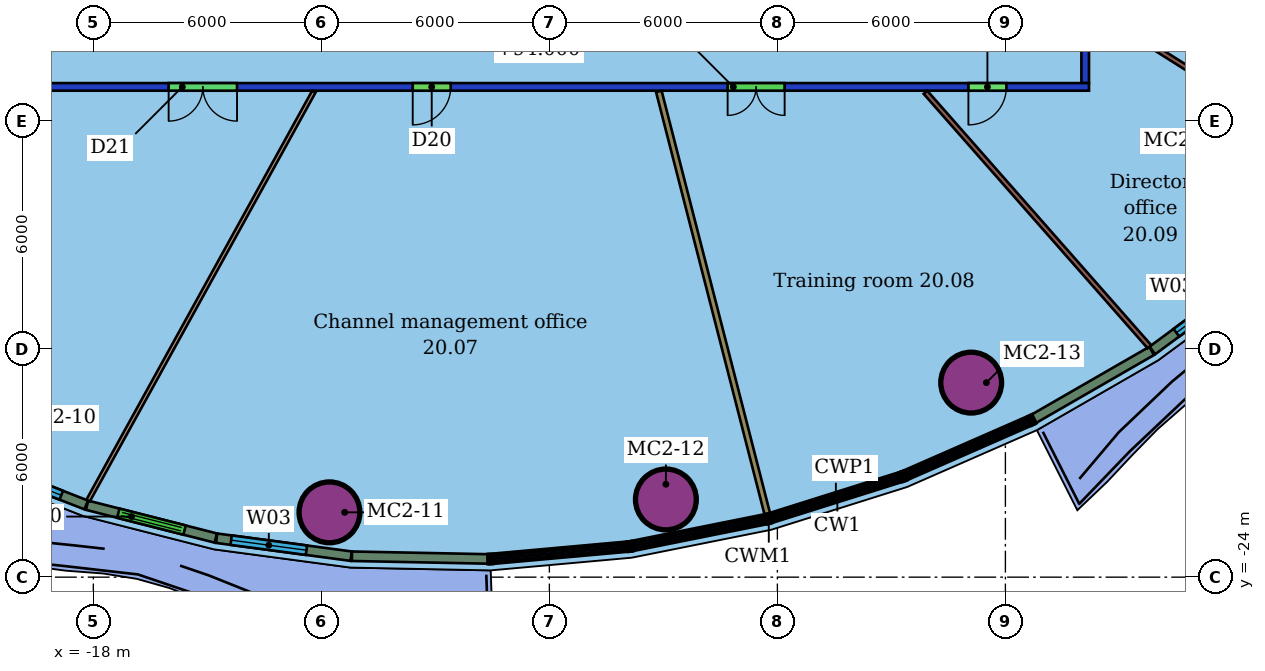
"""IFC4 building model, lengths in metres.
Left out: names, types, materials, properties, quantities, classifications, styles, units other than length and angle.
Written with IfcOpenShell. Run it as: python <this file> out.ifc"""

import sys

from ifc_helpers import new_model, si_unit, direction, frame, frame_2d, origin, origin_2d, place, context, subcontext, project, spatial, rectangle, hollow_circle, extrude, element, fill, save


model = new_model("IFC4")
c1 = context("Model", 3, precision=1e-05, world=origin(), true_north=direction((0.0, 1.0)))
c2 = subcontext(c1, "Body", "Model", "MODEL_VIEW")
j1 = project(units=[si_unit("LENGTHUNIT", "METRE"), si_unit("PLANEANGLEUNIT", "RADIAN")], contexts=[c1])
p1 = place(None, origin())
s1 = spatial("IfcSite", under=j1, at=p1, CompositionType="ELEMENT")
p2 = place(p1, origin())
s2 = spatial("IfcBuilding", under=s1, at=p2, CompositionType="ELEMENT")
p3 = place(p2, frame((0.0, 0.0, 92.2)))
s3 = spatial("IfcBuildingStorey", under=s2, at=p3, CompositionType="ELEMENT", Elevation=92.2)
for number, where, z_axis, x_axis in (
    (1, (-11.787, -22.294, 0.0), (0.0, 0.0, 1.0), (1.0, 0.0, 0.0)),
    (2, (-2.934, -21.956, 0.0), (0.0, 0.0, 1.0), (1.0, 0.0, 0.0)),
    (3, (5.1, -18.881, 0.0), (0.0, 0.0, 1.0), (1.0, 0.0, 0.0)),
):
    element("IfcColumn", number, at=place(p3, frame(where, z_axis=z_axis, x_axis=x_axis)), inside=s3, PredefinedType="COLUMN", context=c2, shape_type="SweptSolid", body=[
        extrude(hollow_circle(Radius=0.8, WallThickness=0.055, at=origin_2d()), origin(), (0.0, 0.0, 1.0), 3.45),
    ])
p4 = place(p3, frame((8.2, -11.1, 0.0), z_axis=(0.0, 0.0, 1.0), x_axis=(-1.0, 0.0, 0.0)))
e4 = element("IfcWall", 4, at=p4, inside=s3, PredefinedType="PARTITIONING", context=c2, shape_type="SweptSolid", body=[
    extrude(rectangle(XDim=28.4, YDim=0.2, at=frame_2d((14.2, 0.0))), origin(), (0.0, 0.0, 1.0), 3.0),
])
p5 = place(p4, frame((22.418, 0.0, 0.0)))
e5 = element("IfcOpeningElement", 5, at=p5, cuts=e4, PredefinedType="OPENING", context=c2, shape_type="SweptSolid", body=[
    extrude(rectangle(XDim=1.8, YDim=2.1, at=frame_2d((0.9, 1.05))), frame((0.0, 0.11, 0.0), z_axis=(0.0, -1.0, 0.0), x_axis=(1.0, 0.0, 0.0)), (0.0, 0.0, 1.0), 0.22),
])
p6 = place(p4, frame((16.796, 0.0, 0.0)))
e6 = element("IfcOpeningElement", 6, at=p6, cuts=e4, PredefinedType="OPENING", context=c2, shape_type="SweptSolid", body=[
    extrude(rectangle(XDim=1.0, YDim=2.1, at=frame_2d((0.5, 1.05))), frame((0.0, 0.11, 0.0), z_axis=(0.0, -1.0, 0.0), x_axis=(1.0, 0.0, 0.0)), (0.0, 0.0, 1.0), 0.22),
])
p7 = place(p4, frame((8.009, 0.0, 0.0)))
e7 = element("IfcOpeningElement", 7, at=p7, cuts=e4, PredefinedType="OPENING", context=c2, shape_type="SweptSolid", body=[
    extrude(rectangle(XDim=1.5, YDim=2.1, at=frame_2d((0.75, 1.05))), frame((0.0, 0.11, 0.0), z_axis=(0.0, -1.0, 0.0), x_axis=(1.0, 0.0, 0.0)), (0.0, 0.0, 1.0), 0.22),
])
p8 = place(p4, frame((2.173, 0.0, 0.0)))
e8 = element("IfcOpeningElement", 8, at=p8, cuts=e4, PredefinedType="OPENING", context=c2, shape_type="SweptSolid", body=[
    extrude(rectangle(XDim=1.0, YDim=2.4, at=frame_2d((0.5, 1.2))), frame((0.0, 0.11, 0.0), z_axis=(0.0, -1.0, 0.0), x_axis=(1.0, 0.0, 0.0)), (0.0, 0.0, 1.0), 0.22),
])
p9 = place(p3, frame((8.1, 11.0, 0.0), z_axis=(0.0, 0.0, 1.0), x_axis=(0.0, -1.0, 0.0)))
e9 = element("IfcWall", 9, at=p9, inside=s3, PredefinedType="PARTITIONING", context=c2, shape_type="SweptSolid", body=[
    extrude(rectangle(XDim=22.0, YDim=0.2, at=frame_2d((11.0, 0.0))), origin(), (0.0, 0.0, 1.0), 3.0),
])
p10 = place(p9, frame((10.766, 0.0, 0.0)))
e10 = element("IfcOpeningElement", 10, at=p10, cuts=e9, PredefinedType="OPENING", context=c2, shape_type="SweptSolid", body=[
    extrude(rectangle(XDim=1.8, YDim=2.1, at=frame_2d((0.9, 1.05))), frame((0.0, 0.11, 0.0), z_axis=(0.0, -1.0, 0.0), x_axis=(1.0, 0.0, 0.0)), (0.0, 0.0, 1.0), 0.22),
])
p11 = place(p3, frame((-18.138, -21.985, 0.0), z_axis=(0.0, 0.0, 1.0), x_axis=(0.483337741679, 0.875433965225, 0.0)))
e11 = element("IfcWall", 11, at=p11, inside=s3, PredefinedType="PARTITIONING", context=c2, shape_type="SweptSolid", body=[
    extrude(rectangle(XDim=12.292, YDim=0.1, at=frame_2d((6.146, 0.0))), origin(), (0.0, 0.0, 1.0), 3.45),
])
p12 = place(p3, frame((-0.264, -22.34, 0.0), z_axis=(0.0, 0.0, 1.0), x_axis=(-0.248704264298, 0.968579469594, 0.0)))
e12 = element("IfcWall", 12, at=p12, inside=s3, PredefinedType="PARTITIONING", context=c2, shape_type="SweptSolid", body=[
    extrude(rectangle(XDim=11.482, YDim=0.15, at=frame_2d((5.741, 0.0))), origin(), (0.0, 0.0, 1.0), 3.45),
])
p13 = place(p3, frame((9.79, -17.936, 0.0), z_axis=(0.0, 0.0, 1.0), x_axis=(-0.660747590453, 0.750608167895, 0.0)))
e13 = element("IfcWall", 13, at=p13, inside=s3, PredefinedType="PARTITIONING", context=c2, shape_type="SweptSolid", body=[
    extrude(rectangle(XDim=8.919, YDim=0.125, at=frame_2d((4.46, 0.0))), origin(), (0.0, 0.0, 1.0), 3.45),
])
p14 = place(p3, frame((15.228, -13.418, 0.0), z_axis=(0.0, 0.0, 1.0), x_axis=(-0.845280625948, 0.534322621079, 0.0)))
e14 = element("IfcWall", 14, at=p14, inside=s3, PredefinedType="PARTITIONING", context=c2, shape_type="SweptSolid", body=[
    extrude(rectangle(XDim=8.275, YDim=0.125, at=frame_2d((4.138, 0.0))), origin(), (0.0, 0.0, 1.0), 3.45),
])
p15 = place(p3, frame((-21.365, -20.861, 0.0), z_axis=(0.0, 0.0, 1.0), x_axis=(0.931689933138, -0.363254550541, 0.0)))
e15 = element("IfcWall", 15, at=p15, inside=s3, PredefinedType="SOLIDWALL", context=c2, shape_type="SweptSolid", body=[
    extrude(rectangle(XDim=3.41, YDim=0.25, at=frame_2d((1.705, 0.0))), origin(), (0.0, 0.0, 1.0), 3.05),
])
p16 = place(p15, frame((0.705, 0.0, 0.9)))
e16 = element("IfcOpeningElement", 16, at=p16, cuts=e15, PredefinedType="OPENING", context=c2, shape_type="SweptSolid", body=[
    extrude(rectangle(XDim=2.0, YDim=2.1, at=frame_2d((1.0, 1.05))), frame((0.0, 0.135, 0.0), z_axis=(0.0, -1.0, 0.0), x_axis=(1.0, 0.0, 0.0)), (0.0, 0.0, 1.0), 0.27),
])
p17 = place(p3, frame((-18.165, -22.107, 0.0), z_axis=(0.0, 0.0, 1.0), x_axis=(0.969010602055, -0.247019135097, 0.0)))
e17 = element("IfcWall", 17, at=p17, inside=s3, PredefinedType="SOLIDWALL", context=c2, shape_type="SweptSolid", body=[
    extrude(rectangle(XDim=3.496, YDim=0.25, at=frame_2d((1.748, 0.0))), origin(), (0.0, 0.0, 1.0), 3.05),
])
p18 = place(p17, frame((0.848, 0.0, 0.0)))
e18 = element("IfcOpeningElement", 18, at=p18, cuts=e17, PredefinedType="OPENING", context=c2, shape_type="SweptSolid", body=[
    extrude(rectangle(XDim=1.8, YDim=2.4, at=frame_2d((0.9, 1.2))), frame((0.0, 0.135, 0.0), z_axis=(0.0, -1.0, 0.0), x_axis=(1.0, 0.0, 0.0)), (0.0, 0.0, 1.0), 0.27),
])
p19 = place(p3, frame((-14.755, -22.975, 0.0), z_axis=(0.0, 0.0, 1.0), x_axis=(0.991208182453, -0.132311522699, 0.0)))
e19 = element("IfcWall", 19, at=p19, inside=s3, PredefinedType="SOLIDWALL", context=c2, shape_type="SweptSolid", body=[
    extrude(rectangle(XDim=3.571, YDim=0.25, at=frame_2d((1.785, 0.0))), origin(), (0.0, 0.0, 1.0), 3.05),
])
p20 = place(p19, frame((0.385, 0.0, 0.9)))
e20 = element("IfcOpeningElement", 20, at=p20, cuts=e19, PredefinedType="OPENING", context=c2, shape_type="SweptSolid", body=[
    extrude(rectangle(XDim=2.0, YDim=2.1, at=frame_2d((1.0, 1.05))), frame((0.0, 0.135, 0.0), z_axis=(0.0, -1.0, 0.0), x_axis=(1.0, 0.0, 0.0)), (0.0, 0.0, 1.0), 0.27),
])
p21 = place(p3, frame((-11.194, -23.449, 0.0), z_axis=(0.0, 0.0, 1.0), x_axis=(0.999799651437, -0.020016417945, 0.0)))
e21 = element("IfcWall", 21, at=p21, inside=s3, PredefinedType="SOLIDWALL", context=c2, shape_type="SweptSolid", body=[
    extrude(rectangle(XDim=3.586, YDim=0.25, at=frame_2d((1.793, 0.0))), origin(), (0.0, 0.0, 1.0), 3.05),
])
p22 = place(p3, frame((6.741, -19.836, 0.0), z_axis=(0.0, 0.0, 1.0), x_axis=(0.866511818646, 0.49915655675, 0.0)))
e22 = element("IfcWall", 22, at=p22, inside=s3, PredefinedType="SOLIDWALL", context=c2, shape_type="SweptSolid", body=[
    extrude(rectangle(XDim=3.586, YDim=0.25, at=frame_2d((1.793, 0.0))), origin(), (0.0, 0.0, 1.0), 3.05),
])
p23 = place(p3, frame((9.867, -18.034, 0.0), z_axis=(0.0, 0.0, 1.0), x_axis=(0.804847820355, 0.593481243234, 0.0)))
e23 = element("IfcWall", 23, at=p23, inside=s3, PredefinedType="SOLIDWALL", context=c2, shape_type="SweptSolid", body=[
    extrude(rectangle(XDim=3.57, YDim=0.25, at=frame_2d((1.785, 0.0))), origin(), (0.0, 0.0, 1.0), 3.05),
])
p24 = place(p23, frame((0.785, 0.0, 0.9)))
e24 = element("IfcOpeningElement", 24, at=p24, cuts=e23, PredefinedType="OPENING", context=c2, shape_type="SweptSolid", body=[
    extrude(rectangle(XDim=2.0, YDim=2.1, at=frame_2d((1.0, 1.05))), frame((0.0, 0.135, 0.0), z_axis=(0.0, -1.0, 0.0), x_axis=(1.0, 0.0, 0.0)), (0.0, 0.0, 1.0), 0.27),
])
p25 = place(p5, origin())
e25 = element("IfcDoor", 25, at=p25, inside=s3, OperationType="DOUBLE_DOOR_SINGLE_SWING", PredefinedType="DOOR", context=c2, shape_type="SweptSolid", body=[
    extrude(rectangle(XDim=1.8, YDim=2.1, at=frame_2d((0.9, 1.05))), frame((0.0, 0.025, 0.0), z_axis=(0.0, -1.0, 0.0), x_axis=(1.0, 0.0, 0.0)), (0.0, 0.0, 1.0), 0.05),
])
fill(e5, e25)
p26 = place(p6, origin())
e26 = element("IfcDoor", 26, at=p26, inside=s3, OperationType="SINGLE_SWING_RIGHT", PredefinedType="DOOR", context=c2, shape_type="SweptSolid", body=[
    extrude(rectangle(XDim=1.0, YDim=2.1, at=frame_2d((0.5, 1.05))), frame((0.0, 0.025, 0.0), z_axis=(0.0, -1.0, 0.0), x_axis=(1.0, 0.0, 0.0)), (0.0, 0.0, 1.0), 0.05),
])
fill(e6, e26)
p27 = place(p7, origin())
e27 = element("IfcDoor", 27, at=p27, inside=s3, OperationType="DOUBLE_DOOR_SINGLE_SWING", PredefinedType="DOOR", context=c2, shape_type="SweptSolid", body=[
    extrude(rectangle(XDim=1.5, YDim=2.1, at=frame_2d((0.75, 1.05))), frame((0.0, 0.025, 0.0), z_axis=(0.0, -1.0, 0.0), x_axis=(1.0, 0.0, 0.0)), (0.0, 0.0, 1.0), 0.05),
])
fill(e7, e27)
p28 = place(p8, origin())
e28 = element("IfcDoor", 28, at=p28, inside=s3, OperationType="SINGLE_SWING_RIGHT", PredefinedType="DOOR", context=c2, shape_type="SweptSolid", body=[
    extrude(rectangle(XDim=1.0, YDim=2.4, at=frame_2d((0.5, 1.2))), frame((0.0, 0.025, 0.0), z_axis=(0.0, -1.0, 0.0), x_axis=(1.0, 0.0, 0.0)), (0.0, 0.0, 1.0), 0.05),
])
fill(e8, e28)
p29 = place(p16, origin())
e29 = element("IfcWindow", 29, at=p29, inside=s3, PartitioningType="SINGLE_PANEL", PredefinedType="WINDOW", context=c2, shape_type="SweptSolid", body=[
    extrude(rectangle(XDim=2.0, YDim=2.1, at=frame_2d((1.0, 1.05))), frame((0.0, 0.03, 0.0), z_axis=(0.0, -1.0, 0.0), x_axis=(1.0, 0.0, 0.0)), (0.0, 0.0, 1.0), 0.06),
])
fill(e16, e29)
p30 = place(p18, origin())
e30 = element("IfcDoor", 30, at=p30, inside=s3, OperationType="DOUBLE_DOOR_SLIDING", PredefinedType="DOOR", context=c2, shape_type="SweptSolid", body=[
    extrude(rectangle(XDim=1.8, YDim=2.4, at=frame_2d((0.9, 1.2))), frame((0.0, 0.025, 0.0), z_axis=(0.0, -1.0, 0.0), x_axis=(1.0, 0.0, 0.0)), (0.0, 0.0, 1.0), 0.05),
])
fill(e18, e30)
p31 = place(p20, origin())
e31 = element("IfcWindow", 31, at=p31, inside=s3, PartitioningType="SINGLE_PANEL", PredefinedType="WINDOW", context=c2, shape_type="SweptSolid", body=[
    extrude(rectangle(XDim=2.0, YDim=2.1, at=frame_2d((1.0, 1.05))), frame((0.0, 0.03, 0.0), z_axis=(0.0, -1.0, 0.0), x_axis=(1.0, 0.0, 0.0)), (0.0, 0.0, 1.0), 0.06),
])
fill(e20, e31)
p32 = place(p24, origin())
e32 = element("IfcWindow", 32, at=p32, inside=s3, PartitioningType="SINGLE_PANEL", PredefinedType="WINDOW", context=c2, shape_type="SweptSolid", body=[
    extrude(rectangle(XDim=2.0, YDim=2.1, at=frame_2d((1.0, 1.05))), frame((0.0, 0.03, 0.0), z_axis=(0.0, -1.0, 0.0), x_axis=(1.0, 0.0, 0.0)), (0.0, 0.0, 1.0), 0.06),
])
fill(e24, e32)
save(model, sys.argv[1])
